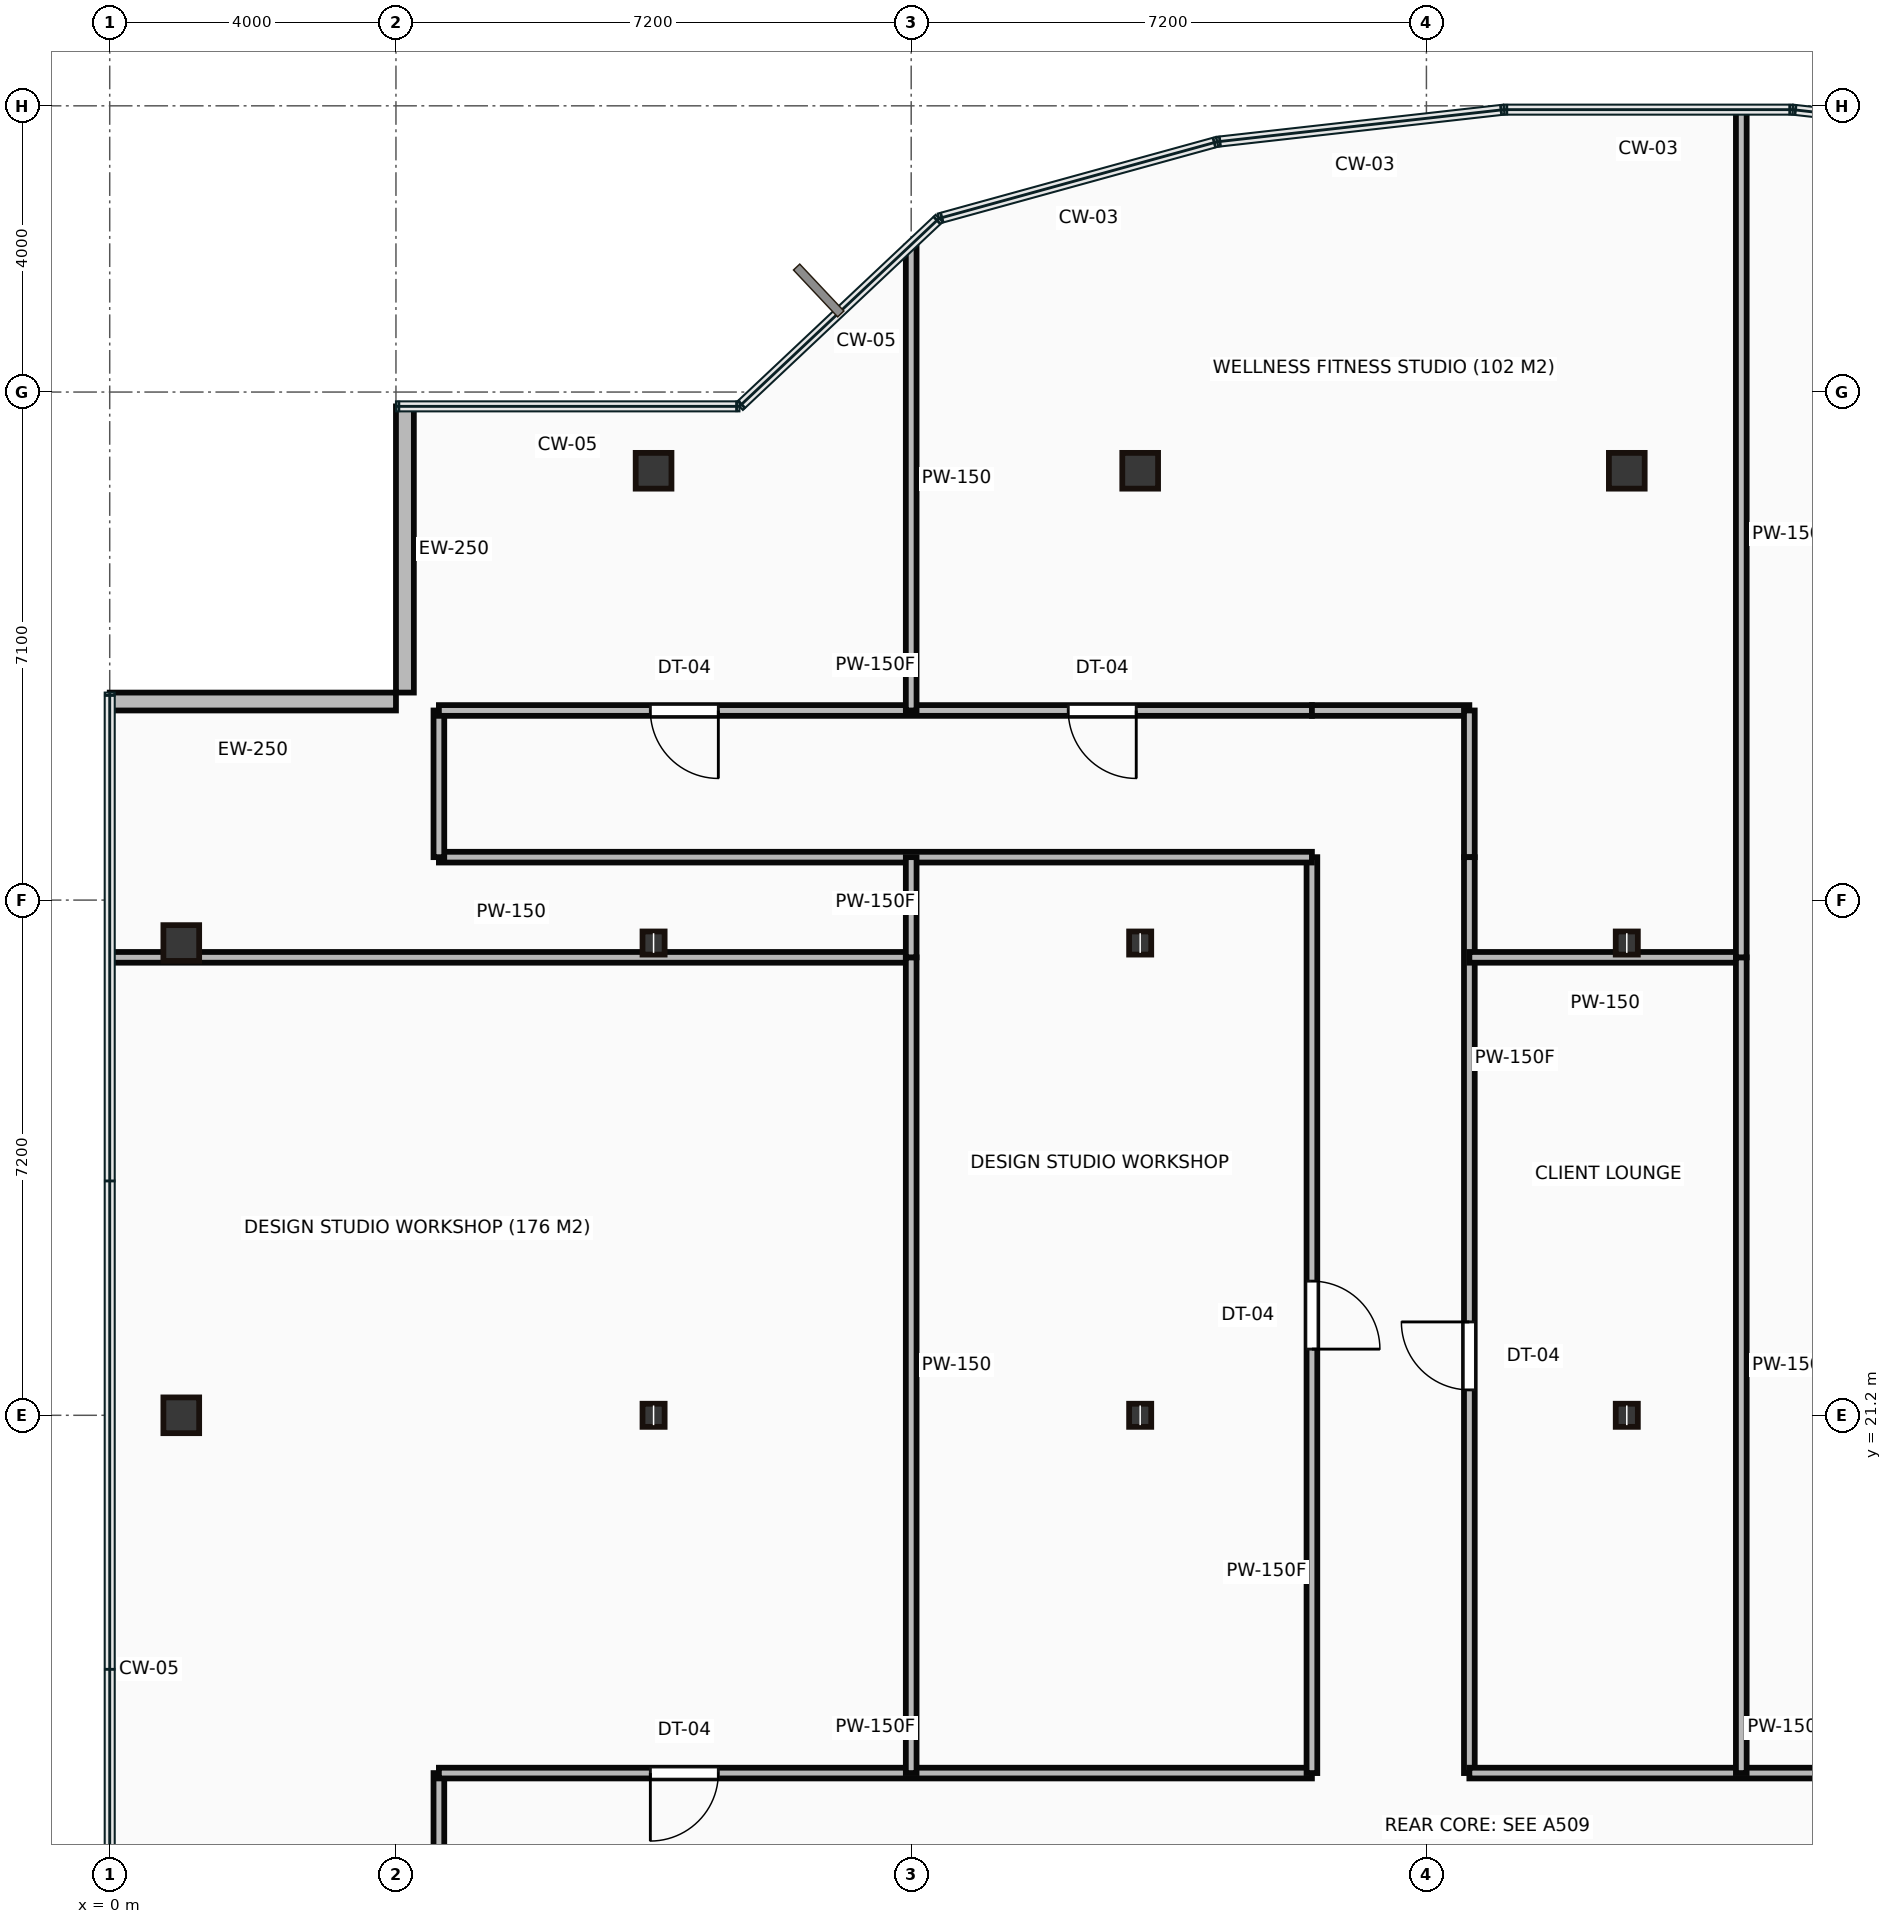
"""IFC4 building model, lengths in metres.
Left out: names, types, materials, properties, quantities, classifications, styles, units other than length and angle.
Written with IfcOpenShell. Run it as: python <this file> out.ifc"""

import sys

from ifc_helpers import new_model, si_unit, direction, frame, frame_2d, origin, origin_2d, place, context, subcontext, project, spatial, rectangle, hollow_rectangle, i_section, extrude, source, transform, mapped, element, fill, save


model = new_model("IFC4")
c1 = context("Model", 3, precision=1e-05, world=origin(), true_north=direction((0.0, 1.0)))
c2 = subcontext(c1, "Body", "Model", "MODEL_VIEW")
j1 = project(units=[si_unit("LENGTHUNIT", "METRE"), si_unit("PLANEANGLEUNIT", "RADIAN")], contexts=[c1])
p1 = place(None, origin())
s1 = spatial("IfcSite", under=j1, at=p1, CompositionType="ELEMENT")
p2 = place(p1, origin())
s2 = spatial("IfcBuilding", under=s1, at=p2, CompositionType="ELEMENT")
p3 = place(p2, frame((0.0, 0.0, 214.15)))
s3 = spatial("IfcBuildingStorey", under=s2, at=p3, CompositionType="ELEMENT", Elevation=214.15)
m1 = source(origin(), c2, "Body", "SweptSolid", [
    extrude(hollow_rectangle(XDim=0.5, YDim=0.5, WallThickness=0.022, at=origin_2d()), origin(), (0.0, 0.0, 1.0), 3.65),
])
for number, where, z_axis, x_axis in (
    (1, (1.0, 21.2, 0.0), (0.0, 0.0, 1.0), (1.0, 0.0, 0.0)),
    (2, (1.0, 27.8, 0.0), (0.0, 0.0, 1.0), (1.0, 0.0, 0.0)),
):
    element("IfcColumn", number, at=place(p3, frame(where, z_axis=z_axis, x_axis=x_axis)), inside=s3, PredefinedType="COLUMN", context=c2, shape_type="MappedRepresentation", body=[
        mapped(m1, transform((0.0, 0.0, 0.0))),
    ])
m2 = source(origin(), c2, "Body", "SweptSolid", [
    extrude(i_section(OverallWidth=0.309, OverallDepth=0.323, WebThickness=0.014, FlangeThickness=0.023, at=origin_2d()), origin(), (0.0, 0.0, 1.0), 3.65),
])
for number, where, z_axis, x_axis in (
    (3, (7.6, 21.2, 0.0), (0.0, 0.0, 1.0), (1.0, 0.0, 0.0)),
    (4, (7.6, 27.8, 0.0), (0.0, 0.0, 1.0), (1.0, 0.0, 0.0)),
):
    element("IfcColumn", number, at=place(p3, frame(where, z_axis=z_axis, x_axis=x_axis)), inside=s3, PredefinedType="COLUMN", context=c2, shape_type="MappedRepresentation", body=[
        mapped(m2, transform((0.0, 0.0, 0.0))),
    ])
p4 = place(p3, frame((7.6, 34.4, 0.0), z_axis=(0.0, 0.0, 1.0), x_axis=(1.0, 0.0, 0.0)))
e5 = element("IfcColumn", 5, at=p4, inside=s3, PredefinedType="COLUMN", context=c2, shape_type="MappedRepresentation", body=[
    mapped(m1, transform((0.0, 0.0, 0.0))),
])
for number, where, z_axis, x_axis in (
    (6, (14.4, 21.2, 0.0), (0.0, 0.0, 1.0), (1.0, 0.0, 0.0)),
    (7, (14.4, 27.8, 0.0), (0.0, 0.0, 1.0), (1.0, 0.0, 0.0)),
):
    element("IfcColumn", number, at=place(p3, frame(where, z_axis=z_axis, x_axis=x_axis)), inside=s3, PredefinedType="COLUMN", context=c2, shape_type="MappedRepresentation", body=[
        mapped(m2, transform((0.0, 0.0, 0.0))),
    ])
p5 = place(p3, frame((14.4, 34.4, 0.0), z_axis=(0.0, 0.0, 1.0), x_axis=(1.0, 0.0, 0.0)))
e8 = element("IfcColumn", 8, at=p5, inside=s3, PredefinedType="COLUMN", context=c2, shape_type="MappedRepresentation", body=[
    mapped(m1, transform((0.0, 0.0, 0.0))),
])
for number, where, z_axis, x_axis in (
    (9, (21.2, 21.2, 0.0), (0.0, 0.0, 1.0), (1.0, 0.0, 0.0)),
    (10, (21.2, 27.8, 0.0), (0.0, 0.0, 1.0), (1.0, 0.0, 0.0)),
):
    element("IfcColumn", number, at=place(p3, frame(where, z_axis=z_axis, x_axis=x_axis)), inside=s3, PredefinedType="COLUMN", context=c2, shape_type="MappedRepresentation", body=[
        mapped(m2, transform((0.0, 0.0, 0.0))),
    ])
p6 = place(p3, frame((21.2, 34.4, 0.0), z_axis=(0.0, 0.0, 1.0), x_axis=(1.0, 0.0, 0.0)))
e11 = element("IfcColumn", 11, at=p6, inside=s3, PredefinedType="COLUMN", context=c2, shape_type="MappedRepresentation", body=[
    mapped(m1, transform((0.0, 0.0, 0.0))),
])
m3 = source(origin(), c2, "Body", "SweptSolid", [
    extrude(rectangle(XDim=4.0, YDim=0.25, at=frame_2d((2.0, 0.0))), origin(), (0.0, 0.0, 1.0), 3.4),
])
for number, where, z_axis, x_axis in (
    (12, (4.125, 35.3, 0.0), (0.0, 0.0, 1.0), (0.0, -1.0, 0.0)),
    (13, (4.0, 31.175, 0.0), (0.0, 0.0, 1.0), (-1.0, 0.0, 0.0)),
):
    element("IfcWall", number, at=place(p3, frame(where, z_axis=z_axis, x_axis=x_axis)), inside=s3, PredefinedType="STANDARD", context=c2, shape_type="MappedRepresentation", body=[
        mapped(m3, transform((0.0, 0.0, 0.0))),
    ])
m4 = source(origin(), c2, "Body", "SweptSolid", [
    extrude(rectangle(XDim=2.12, YDim=0.15, at=frame_2d((1.06, 0.0))), origin(), (0.0, 0.0, 1.0), 3.4),
])
p7 = place(p3, frame((4.6, 14.08, 0.0), z_axis=(0.0, 0.0, 1.0), x_axis=(0.0, 1.0, 0.0)))
e14 = element("IfcWall", 14, at=p7, inside=s3, PredefinedType="PARTITIONING", context=c2, shape_type="MappedRepresentation", body=[
    mapped(m4, transform((0.0, 0.0, 0.0))),
])
m5 = source(origin(), c2, "Body", "SweptSolid", [
    extrude(rectangle(XDim=12.2, YDim=0.15, at=frame_2d((6.1, 0.0))), origin(), (0.0, 0.0, 1.0), 3.4),
])
p8 = place(p3, frame((4.6, 16.2, 0.0), z_axis=(0.0, 0.0, 1.0), x_axis=(1.0, 0.0, 0.0)))
e15 = element("IfcWall", 15, at=p8, inside=s3, PredefinedType="PARTITIONING", context=c2, shape_type="MappedRepresentation", body=[
    mapped(m5, transform((0.0, 0.0, 0.0))),
])
p9 = place(p8, frame((2.955, 0.0, 0.0)))
e16 = element("IfcOpeningElement", 16, at=p9, cuts=e15, PredefinedType="OPENING", context=c2, shape_type="SweptSolid", body=[
    extrude(rectangle(XDim=0.95, YDim=2.15, at=frame_2d((0.475, 1.075))), frame((0.0, 0.085, 0.0), z_axis=(0.0, -1.0, 0.0), x_axis=(1.0, 0.0, 0.0)), (0.0, 0.0, 1.0), 0.17),
])
m6 = source(origin(), c2, "Body", "SweptSolid", [
    extrude(rectangle(XDim=12.8, YDim=0.15, at=frame_2d((6.4, 0.0))), origin(), (0.0, 0.0, 1.0), 3.4),
])
p10 = place(p3, frame((16.8, 16.2, 0.0), z_axis=(0.0, 0.0, 1.0), x_axis=(0.0, 1.0, 0.0)))
e17 = element("IfcWall", 17, at=p10, inside=s3, PredefinedType="PARTITIONING", context=c2, shape_type="MappedRepresentation", body=[
    mapped(m6, transform((0.0, 0.0, 0.0))),
])
p11 = place(p10, frame((5.925, 0.0, 0.0)))
e18 = element("IfcOpeningElement", 18, at=p11, cuts=e17, PredefinedType="OPENING", context=c2, shape_type="SweptSolid", body=[
    extrude(rectangle(XDim=0.95, YDim=2.15, at=frame_2d((0.475, 1.075))), frame((0.0, 0.085, 0.0), z_axis=(0.0, -1.0, 0.0), x_axis=(1.0, 0.0, 0.0)), (0.0, 0.0, 1.0), 0.17),
])
p12 = place(p3, frame((16.8, 29.0, 0.0), z_axis=(0.0, 0.0, 1.0), x_axis=(-1.0, 0.0, 0.0)))
e19 = element("IfcWall", 19, at=p12, inside=s3, PredefinedType="PARTITIONING", context=c2, shape_type="MappedRepresentation", body=[
    mapped(m5, transform((0.0, 0.0, 0.0))),
])
m7 = source(origin(), c2, "Body", "SweptSolid", [
    extrude(rectangle(XDim=2.05, YDim=0.15, at=frame_2d((1.025, 0.0))), origin(), (0.0, 0.0, 1.0), 3.4),
])
p13 = place(p3, frame((4.6, 29.0, 0.0), z_axis=(0.0, 0.0, 1.0), x_axis=(0.0, 1.0, 0.0)))
e20 = element("IfcWall", 20, at=p13, inside=s3, PredefinedType="PARTITIONING", context=c2, shape_type="MappedRepresentation", body=[
    mapped(m7, transform((0.0, 0.0, 0.0))),
])
p14 = place(p3, frame((4.6, 31.05, 0.0), z_axis=(0.0, 0.0, 1.0), x_axis=(1.0, 0.0, 0.0)))
e21 = element("IfcWall", 21, at=p14, inside=s3, PredefinedType="PARTITIONING", context=c2, shape_type="MappedRepresentation", body=[
    mapped(m5, transform((0.0, 0.0, 0.0))),
])
p15 = place(p14, frame((2.955, 0.0, 0.0)))
e22 = element("IfcOpeningElement", 22, at=p15, cuts=e21, PredefinedType="OPENING", context=c2, shape_type="SweptSolid", body=[
    extrude(rectangle(XDim=0.95, YDim=2.15, at=frame_2d((0.475, 1.075))), frame((0.0, 0.085, 0.0), z_axis=(0.0, -1.0, 0.0), x_axis=(1.0, 0.0, 0.0)), (0.0, 0.0, 1.0), 0.17),
])
p16 = place(p14, frame((8.795, 0.0, 0.0)))
e23 = element("IfcOpeningElement", 23, at=p16, cuts=e21, PredefinedType="OPENING", context=c2, shape_type="SweptSolid", body=[
    extrude(rectangle(XDim=0.95, YDim=2.15, at=frame_2d((0.475, 1.075))), frame((0.0, 0.085, 0.0), z_axis=(0.0, -1.0, 0.0), x_axis=(1.0, 0.0, 0.0)), (0.0, 0.0, 1.0), 0.17),
])
m8 = source(origin(), c2, "Body", "SweptSolid", [
    extrude(rectangle(XDim=2.2, YDim=0.15, at=frame_2d((1.1, 0.0))), origin(), (0.0, 0.0, 1.0), 3.4),
])
p17 = place(p3, frame((16.8, 31.05, 0.0), z_axis=(0.0, 0.0, 1.0), x_axis=(1.0, 0.0, 0.0)))
e24 = element("IfcWall", 24, at=p17, inside=s3, PredefinedType="PARTITIONING", context=c2, shape_type="MappedRepresentation", body=[
    mapped(m8, transform((0.0, 0.0, 0.0))),
])
p18 = place(p3, frame((19.0, 31.05, 0.0), z_axis=(0.0, 0.0, 1.0), x_axis=(0.0, -1.0, 0.0)))
e25 = element("IfcWall", 25, at=p18, inside=s3, PredefinedType="PARTITIONING", context=c2, shape_type="MappedRepresentation", body=[
    mapped(m7, transform((0.0, 0.0, 0.0))),
])
p19 = place(p3, frame((19.0, 29.0, 0.0), z_axis=(0.0, 0.0, 1.0), x_axis=(0.0, -1.0, 0.0)))
e26 = element("IfcWall", 26, at=p19, inside=s3, PredefinedType="PARTITIONING", context=c2, shape_type="MappedRepresentation", body=[
    mapped(m6, transform((0.0, 0.0, 0.0))),
])
p20 = place(p19, frame((6.495, 0.0, 0.0)))
e27 = element("IfcOpeningElement", 27, at=p20, cuts=e26, PredefinedType="OPENING", context=c2, shape_type="SweptSolid", body=[
    extrude(rectangle(XDim=0.95, YDim=2.15, at=frame_2d((0.475, 1.075))), frame((0.0, 0.085, 0.0), z_axis=(0.0, -1.0, 0.0), x_axis=(1.0, 0.0, 0.0)), (0.0, 0.0, 1.0), 0.17),
])
m9 = source(origin(), c2, "Body", "SweptSolid", [
    extrude(rectangle(XDim=20.2, YDim=0.15, at=frame_2d((10.1, 0.0))), origin(), (0.0, 0.0, 1.0), 3.4),
])
p21 = place(p3, frame((19.0, 16.2, 0.0), z_axis=(0.0, 0.0, 1.0), x_axis=(1.0, 0.0, 0.0)))
e28 = element("IfcWall", 28, at=p21, inside=s3, PredefinedType="PARTITIONING", context=c2, shape_type="MappedRepresentation", body=[
    mapped(m9, transform((0.0, 0.0, 0.0))),
])
p22 = place(p21, frame((9.625, 0.0, 0.0)))
e29 = element("IfcOpeningElement", 29, at=p22, cuts=e28, PredefinedType="OPENING", context=c2, shape_type="SweptSolid", body=[
    extrude(rectangle(XDim=0.95, YDim=2.15, at=frame_2d((0.475, 1.075))), frame((0.0, 0.085, 0.0), z_axis=(0.0, -1.0, 0.0), x_axis=(1.0, 0.0, 0.0)), (0.0, 0.0, 1.0), 0.17),
])
p23 = place(p21, frame((17.695, 0.0, 0.0)))
e30 = element("IfcOpeningElement", 30, at=p23, cuts=e28, PredefinedType="OPENING", context=c2, shape_type="SweptSolid", body=[
    extrude(rectangle(XDim=0.95, YDim=2.15, at=frame_2d((0.475, 1.075))), frame((0.0, 0.085, 0.0), z_axis=(0.0, -1.0, 0.0), x_axis=(1.0, 0.0, 0.0)), (0.0, 0.0, 1.0), 0.17),
])
m10 = source(origin(), c2, "Body", "SweptSolid", [
    extrude(rectangle(XDim=11.18, YDim=0.15, at=frame_2d((5.59, 0.0))), origin(), (0.0, 0.0, 1.0), 3.4),
])
p24 = place(p3, frame((0.02, 27.6, 0.0), z_axis=(0.0, 0.0, 1.0), x_axis=(1.0, 0.0, 0.0)))
e31 = element("IfcWall", 31, at=p24, inside=s3, PredefinedType="PARTITIONING", context=c2, shape_type="MappedRepresentation", body=[
    mapped(m10, transform((0.0, 0.0, 0.0))),
])
m11 = source(origin(), c2, "Body", "SweptSolid", [
    extrude(rectangle(XDim=11.4, YDim=0.15, at=frame_2d((5.7, 0.0))), origin(), (0.0, 0.0, 1.0), 3.4),
])
p25 = place(p3, frame((11.2, 27.6, 0.0), z_axis=(0.0, 0.0, 1.0), x_axis=(0.0, -1.0, 0.0)))
e32 = element("IfcWall", 32, at=p25, inside=s3, PredefinedType="PARTITIONING", context=c2, shape_type="MappedRepresentation", body=[
    mapped(m11, transform((0.0, 0.0, 0.0))),
])
m12 = source(origin(), c2, "Body", "SweptSolid", [
    extrude(rectangle(XDim=1.4, YDim=0.15, at=frame_2d((0.7, 0.0))), origin(), (0.0, 0.0, 1.0), 3.4),
])
p26 = place(p3, frame((11.2, 29.0, 0.0), z_axis=(0.0, 0.0, 1.0), x_axis=(0.0, -1.0, 0.0)))
e33 = element("IfcWall", 33, at=p26, inside=s3, PredefinedType="PARTITIONING", context=c2, shape_type="MappedRepresentation", body=[
    mapped(m12, transform((0.0, 0.0, 0.0))),
])
m13 = source(origin(), c2, "Body", "SweptSolid", [
    extrude(rectangle(XDim=6.482, YDim=0.15, at=frame_2d((3.241, 0.0))), origin(), (0.0, 0.0, 1.0), 3.4),
])
p27 = place(p3, frame((11.2, 37.532, 0.0), z_axis=(0.0, 0.0, 1.0), x_axis=(0.0, -1.0, 0.0)))
e34 = element("IfcWall", 34, at=p27, inside=s3, PredefinedType="PARTITIONING", context=c2, shape_type="MappedRepresentation", body=[
    mapped(m13, transform((0.0, 0.0, 0.0))),
])
m14 = source(origin(), c2, "Body", "SweptSolid", [
    extrude(rectangle(XDim=3.8, YDim=0.15, at=frame_2d((1.9, 0.0))), origin(), (0.0, 0.0, 1.0), 3.4),
])
p28 = place(p3, frame((22.8, 27.6, 0.0), z_axis=(0.0, 0.0, 1.0), x_axis=(-1.0, 0.0, 0.0)))
e35 = element("IfcWall", 35, at=p28, inside=s3, PredefinedType="PARTITIONING", context=c2, shape_type="MappedRepresentation", body=[
    mapped(m14, transform((0.0, 0.0, 0.0))),
])
p29 = place(p3, frame((22.8, 27.6, 0.0), z_axis=(0.0, 0.0, 1.0), x_axis=(0.0, -1.0, 0.0)))
e36 = element("IfcWall", 36, at=p29, inside=s3, PredefinedType="PARTITIONING", context=c2, shape_type="MappedRepresentation", body=[
    mapped(m11, transform((0.0, 0.0, 0.0))),
])
m15 = source(origin(), c2, "Body", "SweptSolid", [
    extrude(rectangle(XDim=11.827, YDim=0.15, at=frame_2d((5.913, 0.0))), origin(), (0.0, 0.0, 1.0), 3.4),
])
p30 = place(p3, frame((22.8, 39.427, 0.0), z_axis=(0.0, 0.0, 1.0), x_axis=(0.0, -1.0, 0.0)))
e37 = element("IfcWall", 37, at=p30, inside=s3, PredefinedType="PARTITIONING", context=c2, shape_type="MappedRepresentation", body=[
    mapped(m15, transform((0.0, 0.0, 0.0))),
])
m16 = source(origin(), c2, "Body", "SweptSolid", [
    extrude(rectangle(XDim=0.95, YDim=2.15, at=frame_2d((0.475, 1.075))), frame((0.0, 0.025, 0.0), z_axis=(0.0, -1.0, 0.0), x_axis=(1.0, 0.0, 0.0)), (0.0, 0.0, 1.0), 0.05),
])
p31 = place(p9, origin())
e38 = element("IfcDoor", 38, at=p31, inside=s3, OperationType="SINGLE_SWING_LEFT", PredefinedType="DOOR", context=c2, shape_type="MappedRepresentation", body=[
    mapped(m16, transform((0.0, 0.0, 0.0))),
])
fill(e16, e38)
p32 = place(p15, origin())
e39 = element("IfcDoor", 39, at=p32, inside=s3, OperationType="SINGLE_SWING_RIGHT", PredefinedType="DOOR", context=c2, shape_type="MappedRepresentation", body=[
    mapped(m16, transform((0.0, 0.0, 0.0))),
])
fill(e22, e39)
p33 = place(p11, origin())
e40 = element("IfcDoor", 40, at=p33, inside=s3, OperationType="SINGLE_SWING_LEFT", PredefinedType="DOOR", context=c2, shape_type="MappedRepresentation", body=[
    mapped(m16, transform((0.0, 0.0, 0.0))),
])
fill(e18, e40)
p34 = place(p16, origin())
e41 = element("IfcDoor", 41, at=p34, inside=s3, OperationType="SINGLE_SWING_RIGHT", PredefinedType="DOOR", context=c2, shape_type="MappedRepresentation", body=[
    mapped(m16, transform((0.0, 0.0, 0.0))),
])
fill(e23, e41)
p35 = place(p20, origin())
e42 = element("IfcDoor", 42, at=p35, inside=s3, OperationType="SINGLE_SWING_LEFT", PredefinedType="DOOR", context=c2, shape_type="MappedRepresentation", body=[
    mapped(m16, transform((0.0, 0.0, 0.0))),
])
fill(e27, e42)
save(model, sys.argv[1])
